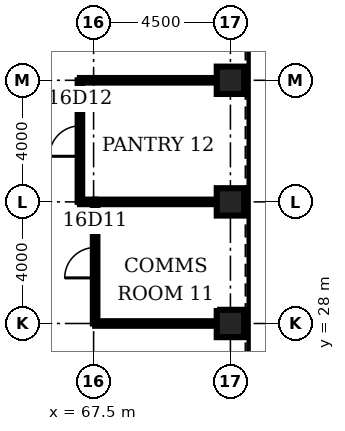
"""IFC4 building model, lengths in metres.
Left out: names, types, materials, properties, quantities, classifications, styles, units other than length and angle.
Written with IfcOpenShell. Run it as: python <this file> out.ifc"""

import sys

from ifc_helpers import new_model, si_unit, direction, frame, frame_2d, origin, origin_2d, place, context, subcontext, project, spatial, rectangle, hollow_rectangle, extrude, element, fill, save


model = new_model("IFC4")
c1 = context("Model", 3, precision=1e-05, world=origin(), true_north=direction((0.0, 1.0)))
c2 = subcontext(c1, "Body", "Model", "MODEL_VIEW")
j1 = project(units=[si_unit("LENGTHUNIT", "METRE"), si_unit("PLANEANGLEUNIT", "RADIAN")], contexts=[c1])
p1 = place(None, origin())
s1 = spatial("IfcSite", under=j1, at=p1, CompositionType="ELEMENT")
p2 = place(p1, origin())
s2 = spatial("IfcBuilding", under=s1, at=p2, CompositionType="ELEMENT")
p3 = place(p2, frame((0.0, 0.0, 77.0)))
s3 = spatial("IfcBuildingStorey", under=s2, at=p3, CompositionType="ELEMENT", Elevation=77.0)
for number, where, z_axis, x_axis in (
    (1, (72.0, 28.0, 0.0), (0.0, 0.0, 1.0), (1.0, 0.0, 0.0)),
    (2, (72.0, 32.0, 0.0), (0.0, 0.0, 1.0), (1.0, 0.0, 0.0)),
    (3, (72.0, 36.0, 0.0), (0.0, 0.0, 1.0), (1.0, 0.0, 0.0)),
):
    element("IfcColumn", number, at=place(p3, frame(where, z_axis=z_axis, x_axis=x_axis)), inside=s3, PredefinedType="COLUMN", context=c2, shape_type="SweptSolid", body=[
        extrude(hollow_rectangle(XDim=0.9, YDim=0.9, WallThickness=0.11, at=origin_2d()), origin(), (0.0, 0.0, 1.0), 4.5),
    ])
p4 = place(p3, frame((67.55, 28.0, 0.0), z_axis=(0.0, 0.0, 1.0), x_axis=(1.0, 0.0, 0.0)))
e4 = element("IfcWall", 4, at=p4, inside=s3, PredefinedType="PARTITIONING", context=c2, shape_type="SweptSolid", body=[
    extrude(rectangle(XDim=4.0, YDim=0.15, at=frame_2d((2.0, 0.0))), origin(), (0.0, 0.0, 1.0), 3.0),
])
p5 = place(p3, frame((67.05, 32.0, 0.0), z_axis=(0.0, 0.0, 1.0), x_axis=(1.0, 0.0, 0.0)))
e5 = element("IfcWall", 5, at=p5, inside=s3, PredefinedType="PARTITIONING", context=c2, shape_type="SweptSolid", body=[
    extrude(rectangle(XDim=0.5, YDim=0.15, at=frame_2d((0.25, 0.0))), origin(), (0.0, 0.0, 1.0), 3.0),
])
p6 = place(p3, frame((67.55, 32.0, 0.0), z_axis=(0.0, 0.0, 1.0), x_axis=(1.0, 0.0, 0.0)))
e6 = element("IfcWall", 6, at=p6, inside=s3, PredefinedType="PARTITIONING", context=c2, shape_type="SweptSolid", body=[
    extrude(rectangle(XDim=4.0, YDim=0.15, at=frame_2d((2.0, 0.0))), origin(), (0.0, 0.0, 1.0), 3.0),
])
p7 = place(p3, frame((67.05, 36.0, 0.0), z_axis=(0.0, 0.0, 1.0), x_axis=(1.0, 0.0, 0.0)))
e7 = element("IfcWall", 7, at=p7, inside=s3, PredefinedType="PARTITIONING", context=c2, shape_type="SweptSolid", body=[
    extrude(rectangle(XDim=4.5, YDim=0.15, at=frame_2d((2.25, 0.0))), origin(), (0.0, 0.0, 1.0), 3.0),
])
p8 = place(p3, frame((67.05, 32.0, 0.0), z_axis=(0.0, 0.0, 1.0), x_axis=(0.0, 1.0, 0.0)))
e8 = element("IfcWall", 8, at=p8, inside=s3, PredefinedType="PARTITIONING", context=c2, shape_type="SweptSolid", body=[
    extrude(rectangle(XDim=4.0, YDim=0.15, at=frame_2d((2.0, 0.0))), origin(), (0.0, 0.0, 1.0), 3.0),
])
p9 = place(p8, frame((1.5, 0.0, 0.0)))
e9 = element("IfcOpeningElement", 9, at=p9, cuts=e8, PredefinedType="OPENING", context=c2, shape_type="SweptSolid", body=[
    extrude(rectangle(XDim=1.0, YDim=2.1, at=frame_2d((0.5, 1.05))), frame((0.0, 0.085, 0.0), z_axis=(0.0, -1.0, 0.0), x_axis=(1.0, 0.0, 0.0)), (0.0, 0.0, 1.0), 0.17),
])
p10 = place(p3, frame((67.55, 28.0, 0.0), z_axis=(0.0, 0.0, 1.0), x_axis=(0.0, 1.0, 0.0)))
e10 = element("IfcWall", 10, at=p10, inside=s3, PredefinedType="PARTITIONING", context=c2, shape_type="SweptSolid", body=[
    extrude(rectangle(XDim=4.0, YDim=0.15, at=frame_2d((2.0, 0.0))), origin(), (0.0, 0.0, 1.0), 3.0),
])
p11 = place(p10, frame((1.5, 0.0, 0.0)))
e11 = element("IfcOpeningElement", 11, at=p11, cuts=e10, PredefinedType="OPENING", context=c2, shape_type="SweptSolid", body=[
    extrude(rectangle(XDim=1.0, YDim=2.1, at=frame_2d((0.5, 1.05))), frame((0.0, 0.085, 0.0), z_axis=(0.0, -1.0, 0.0), x_axis=(1.0, 0.0, 0.0)), (0.0, 0.0, 1.0), 0.17),
])
p12 = place(p11, origin())
e12 = element("IfcDoor", 12, at=p12, inside=s3, OperationType="SINGLE_SWING_LEFT", PredefinedType="DOOR", context=c2, shape_type="SweptSolid", body=[
    extrude(rectangle(XDim=1.0, YDim=2.1, at=frame_2d((0.5, 1.05))), frame((0.0, 0.025, 0.0), z_axis=(0.0, -1.0, 0.0), x_axis=(1.0, 0.0, 0.0)), (0.0, 0.0, 1.0), 0.05),
])
fill(e11, e12)
p13 = place(p9, origin())
e13 = element("IfcDoor", 13, at=p13, inside=s3, OperationType="SINGLE_SWING_LEFT", PredefinedType="DOOR", context=c2, shape_type="SweptSolid", body=[
    extrude(rectangle(XDim=1.0, YDim=2.1, at=frame_2d((0.5, 1.05))), frame((0.0, 0.025, 0.0), z_axis=(0.0, -1.0, 0.0), x_axis=(1.0, 0.0, 0.0)), (0.0, 0.0, 1.0), 0.05),
])
fill(e9, e13)
save(model, sys.argv[1])
